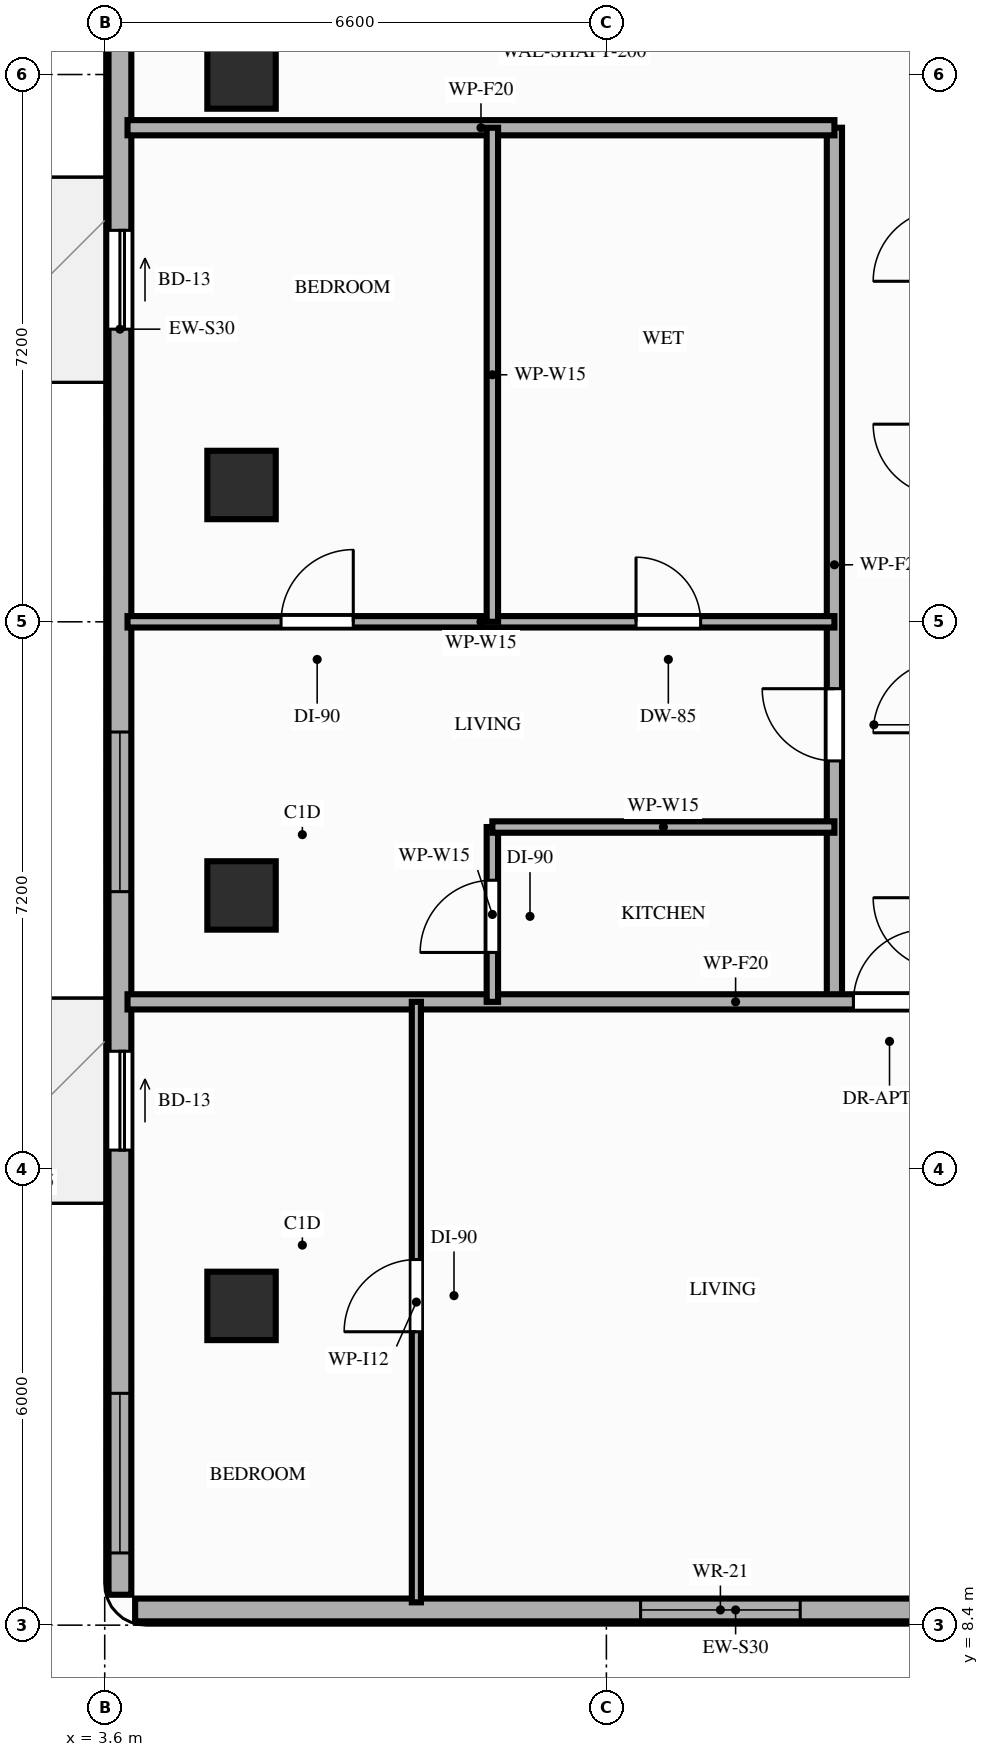
"""IFC4 building model, lengths in metres.
Left out: names, types, materials, properties, quantities, classifications, styles, units other than length and angle.
Written with IfcOpenShell. Run it as: python <this file> out.ifc"""

import sys

from ifc_helpers import new_model, si_unit, direction, frame, frame_2d, origin, origin_2d, place, context, subcontext, project, spatial, rectangle, extrude, element, fill, save


model = new_model("IFC4")
c1 = context("Model", 3, precision=1e-05, world=origin(), true_north=direction((0.0, 1.0)))
c2 = subcontext(c1, "Body", "Model", "MODEL_VIEW")
j1 = project(units=[si_unit("LENGTHUNIT", "METRE"), si_unit("PLANEANGLEUNIT", "RADIAN")], contexts=[c1])
p1 = place(None, origin())
s1 = spatial("IfcSite", under=j1, at=p1, CompositionType="ELEMENT")
p2 = place(p1, origin())
s2 = spatial("IfcBuilding", under=s1, at=p2, CompositionType="ELEMENT")
p3 = place(p2, frame((0.0, 0.0, 176.0)))
s3 = spatial("IfcBuildingStorey", under=s2, at=p3, CompositionType="ELEMENT", Elevation=176.0)
for number, where, z_axis, x_axis in (
    (1, (5.4, 12.6, 0.0), (0.0, 0.0, 1.0), (1.0, 0.0, 0.0)),
    (2, (5.4, 18.0, 0.0), (0.0, 0.0, 1.0), (1.0, 0.0, 0.0)),
    (3, (5.4, 23.4, 0.0), (0.0, 0.0, 1.0), (1.0, 0.0, 0.0)),
    (4, (5.4, 28.8, 0.0), (0.0, 0.0, 1.0), (1.0, 0.0, 0.0)),
):
    element("IfcColumn", number, at=place(p3, frame(where, z_axis=z_axis, x_axis=x_axis)), inside=s3, PredefinedType="COLUMN", context=c2, shape_type="SweptSolid", body=[
        extrude(rectangle(XDim=0.9, YDim=0.9, at=origin_2d()), origin(), (0.0, 0.0, 1.0), 3.2),
    ])
p4 = place(p3, frame((4.0, 8.6, 0.0), z_axis=(0.0, 0.0, 1.0), x_axis=(1.0, 0.0, 0.0)))
e5 = element("IfcWall", 5, at=p4, inside=s3, PredefinedType="STANDARD", context=c2, shape_type="SweptSolid", body=[
    extrude(rectangle(XDim=15.8, YDim=0.3, at=frame_2d((7.9, 0.0))), origin(), (0.0, 0.0, 1.0), 3.02),
])
p5 = place(p4, frame((6.65, 0.0, 0.85)))
e6 = element("IfcOpeningElement", 6, at=p5, cuts=e5, PredefinedType="OPENING", context=c2, shape_type="SweptSolid", body=[
    extrude(rectangle(XDim=2.1, YDim=1.8, at=frame_2d((1.05, 0.9))), frame((0.0, 0.16, 0.0), z_axis=(0.0, -1.0, 0.0), x_axis=(1.0, 0.0, 0.0)), (0.0, 0.0, 1.0), 0.32),
])
p6 = place(p4, frame((12.63, 0.0, 0.85)))
e7 = element("IfcOpeningElement", 7, at=p6, cuts=e5, PredefinedType="OPENING", context=c2, shape_type="SweptSolid", body=[
    extrude(rectangle(XDim=2.1, YDim=1.8, at=frame_2d((1.05, 0.9))), frame((0.0, 0.16, 0.0), z_axis=(0.0, -1.0, 0.0), x_axis=(1.0, 0.0, 0.0)), (0.0, 0.0, 1.0), 0.32),
])
p7 = place(p3, frame((3.8, 42.1, 0.0), z_axis=(0.0, 0.0, 1.0), x_axis=(0.0, -1.0, 0.0)))
e8 = element("IfcWall", 8, at=p7, inside=s3, PredefinedType="STANDARD", context=c2, shape_type="SweptSolid", body=[
    extrude(rectangle(XDim=33.3, YDim=0.3, at=frame_2d((16.65, 0.0))), origin(), (0.0, 0.0, 1.0), 2.71),
])
p8 = place(p7, frame((26.15, 0.0, 0.0)))
e9 = element("IfcOpeningElement", 9, at=p8, cuts=e8, PredefinedType="OPENING", context=c2, shape_type="SweptSolid", body=[
    extrude(rectangle(XDim=1.3, YDim=2.08, at=frame_2d((0.65, 1.04))), frame((0.0, 0.16, 0.0), z_axis=(0.0, -1.0, 0.0), x_axis=(1.0, 0.0, 0.0)), (0.0, 0.0, 1.0), 0.32),
])
p9 = place(p7, frame((15.35, 0.0, 0.0)))
e10 = element("IfcOpeningElement", 10, at=p9, cuts=e8, PredefinedType="OPENING", context=c2, shape_type="SweptSolid", body=[
    extrude(rectangle(XDim=1.3, YDim=2.08, at=frame_2d((0.65, 1.04))), frame((0.0, 0.16, 0.0), z_axis=(0.0, -1.0, 0.0), x_axis=(1.0, 0.0, 0.0)), (0.0, 0.0, 1.0), 0.32),
])
p10 = place(p7, frame((21.95, 0.0, 0.85)))
e11 = element("IfcOpeningElement", 11, at=p10, cuts=e8, PredefinedType="OPENING", context=c2, shape_type="SweptSolid", body=[
    extrude(rectangle(XDim=2.1, YDim=1.61, at=frame_2d((1.05, 0.805))), frame((0.0, 0.16, 0.0), z_axis=(0.0, -1.0, 0.0), x_axis=(1.0, 0.0, 0.0)), (0.0, 0.0, 1.0), 0.32),
])
p11 = place(p7, frame((30.65, 0.0, 0.85)))
e12 = element("IfcOpeningElement", 12, at=p11, cuts=e8, PredefinedType="OPENING", context=c2, shape_type="SweptSolid", body=[
    extrude(rectangle(XDim=2.1, YDim=1.61, at=frame_2d((1.05, 0.805))), frame((0.0, 0.16, 0.0), z_axis=(0.0, -1.0, 0.0), x_axis=(1.0, 0.0, 0.0)), (0.0, 0.0, 1.0), 0.32),
])
p12 = place(p7, frame((9.75, 0.0, 0.85)))
e13 = element("IfcOpeningElement", 13, at=p12, cuts=e8, PredefinedType="OPENING", context=c2, shape_type="SweptSolid", body=[
    extrude(rectangle(XDim=2.1, YDim=1.61, at=frame_2d((1.05, 0.805))), frame((0.0, 0.16, 0.0), z_axis=(0.0, -1.0, 0.0), x_axis=(1.0, 0.0, 0.0)), (0.0, 0.0, 1.0), 0.32),
])
p13 = place(p7, frame((3.65, 0.0, 0.85)))
e14 = element("IfcOpeningElement", 14, at=p13, cuts=e8, PredefinedType="OPENING", context=c2, shape_type="SweptSolid", body=[
    extrude(rectangle(XDim=2.1, YDim=1.61, at=frame_2d((1.05, 0.805))), frame((0.0, 0.16, 0.0), z_axis=(0.0, -1.0, 0.0), x_axis=(1.0, 0.0, 0.0)), (0.0, 0.0, 1.0), 0.32),
])
p14 = place(p3, frame((13.2, 16.6, 0.0), z_axis=(0.0, 0.0, 1.0), x_axis=(0.0, 1.0, 0.0)))
e15 = element("IfcWall", 15, at=p14, inside=s3, PredefinedType="PARTITIONING", context=c2, shape_type="SweptSolid", body=[
    extrude(rectangle(XDim=11.5, YDim=0.2, at=frame_2d((5.75, 0.0))), origin(), (0.0, 0.0, 1.0), 2.46),
])
p15 = place(p14, frame((3.17, 0.0, 0.0)))
e16 = element("IfcOpeningElement", 16, at=p15, cuts=e15, PredefinedType="OPENING", context=c2, shape_type="SweptSolid", body=[
    extrude(rectangle(XDim=0.95, YDim=2.15, at=frame_2d((0.475, 1.075))), frame((0.0, 0.11, 0.0), z_axis=(0.0, -1.0, 0.0), x_axis=(1.0, 0.0, 0.0)), (0.0, 0.0, 1.0), 0.22),
])
p16 = place(p3, frame((3.9, 16.6, 0.0), z_axis=(0.0, 0.0, 1.0), x_axis=(1.0, 0.0, 0.0)))
e17 = element("IfcWall", 17, at=p16, inside=s3, PredefinedType="PARTITIONING", context=c2, shape_type="SweptSolid", body=[
    extrude(rectangle(XDim=16.0, YDim=0.2, at=frame_2d((8.0, 0.0))), origin(), (0.0, 0.0, 1.0), 2.46),
])
p17 = place(p16, frame((9.55, 0.0, 0.0)))
e18 = element("IfcOpeningElement", 18, at=p17, cuts=e17, PredefinedType="OPENING", context=c2, shape_type="SweptSolid", body=[
    extrude(rectangle(XDim=0.95, YDim=2.15, at=frame_2d((0.475, 1.075))), frame((0.0, 0.11, 0.0), z_axis=(0.0, -1.0, 0.0), x_axis=(1.0, 0.0, 0.0)), (0.0, 0.0, 1.0), 0.22),
])
p18 = place(p3, frame((3.9, 28.1, 0.0), z_axis=(0.0, 0.0, 1.0), x_axis=(1.0, 0.0, 0.0)))
e19 = element("IfcWall", 19, at=p18, inside=s3, PredefinedType="PARTITIONING", context=c2, shape_type="SweptSolid", body=[
    extrude(rectangle(XDim=9.3, YDim=0.2, at=frame_2d((4.65, 0.0))), origin(), (0.0, 0.0, 1.0), 2.46),
])
p19 = place(p3, frame((7.7, 8.7, 0.0), z_axis=(0.0, 0.0, 1.0), x_axis=(0.0, 1.0, 0.0)))
e20 = element("IfcWall", 20, at=p19, inside=s3, PredefinedType="PARTITIONING", context=c2, shape_type="SweptSolid", body=[
    extrude(rectangle(XDim=7.9, YDim=0.12, at=frame_2d((3.95, 0.0))), origin(), (0.0, 0.0, 1.0), 2.46),
])
p20 = place(p19, frame((3.56, 0.0, 0.0)))
e21 = element("IfcOpeningElement", 21, at=p20, cuts=e20, PredefinedType="OPENING", context=c2, shape_type="SweptSolid", body=[
    extrude(rectangle(XDim=0.95, YDim=2.15, at=frame_2d((0.475, 1.075))), frame((0.0, 0.07, 0.0), z_axis=(0.0, -1.0, 0.0), x_axis=(1.0, 0.0, 0.0)), (0.0, 0.0, 1.0), 0.14),
])
p21 = place(p3, frame((3.9, 21.6, 0.0), z_axis=(0.0, 0.0, 1.0), x_axis=(1.0, 0.0, 0.0)))
e22 = element("IfcWall", 22, at=p21, inside=s3, PredefinedType="PARTITIONING", context=c2, shape_type="SweptSolid", body=[
    extrude(rectangle(XDim=9.3, YDim=0.15, at=frame_2d((4.65, 0.0))), origin(), (0.0, 0.0, 1.0), 2.46),
])
p22 = place(p21, frame((2.02, 0.0, 0.0)))
e23 = element("IfcOpeningElement", 23, at=p22, cuts=e22, PredefinedType="OPENING", context=c2, shape_type="SweptSolid", body=[
    extrude(rectangle(XDim=0.95, YDim=2.15, at=frame_2d((0.475, 1.075))), frame((0.0, 0.085, 0.0), z_axis=(0.0, -1.0, 0.0), x_axis=(1.0, 0.0, 0.0)), (0.0, 0.0, 1.0), 0.17),
])
p23 = place(p21, frame((6.69, 0.0, 0.0)))
e24 = element("IfcOpeningElement", 24, at=p23, cuts=e22, PredefinedType="OPENING", context=c2, shape_type="SweptSolid", body=[
    extrude(rectangle(XDim=0.85, YDim=2.1, at=frame_2d((0.425, 1.05))), frame((0.0, 0.085, 0.0), z_axis=(0.0, -1.0, 0.0), x_axis=(1.0, 0.0, 0.0)), (0.0, 0.0, 1.0), 0.17),
])
p24 = place(p3, frame((8.7, 21.6, 0.0), z_axis=(0.0, 0.0, 1.0), x_axis=(0.0, 1.0, 0.0)))
e25 = element("IfcWall", 25, at=p24, inside=s3, PredefinedType="PARTITIONING", context=c2, shape_type="SweptSolid", body=[
    extrude(rectangle(XDim=6.5, YDim=0.15, at=frame_2d((3.25, 0.0))), origin(), (0.0, 0.0, 1.0), 2.46),
])
p25 = place(p3, frame((8.7, 16.6, 0.0), z_axis=(0.0, 0.0, 1.0), x_axis=(0.0, 1.0, 0.0)))
e26 = element("IfcWall", 26, at=p25, inside=s3, PredefinedType="PARTITIONING", context=c2, shape_type="SweptSolid", body=[
    extrude(rectangle(XDim=2.3, YDim=0.15, at=frame_2d((1.15, 0.0))), origin(), (0.0, 0.0, 1.0), 2.46),
])
p26 = place(p25, frame((0.65, 0.0, 0.0)))
e27 = element("IfcOpeningElement", 27, at=p26, cuts=e26, PredefinedType="OPENING", context=c2, shape_type="SweptSolid", body=[
    extrude(rectangle(XDim=0.95, YDim=2.15, at=frame_2d((0.475, 1.075))), frame((0.0, 0.085, 0.0), z_axis=(0.0, -1.0, 0.0), x_axis=(1.0, 0.0, 0.0)), (0.0, 0.0, 1.0), 0.17),
])
p27 = place(p3, frame((8.7, 18.9, 0.0), z_axis=(0.0, 0.0, 1.0), x_axis=(1.0, 0.0, 0.0)))
e28 = element("IfcWall", 28, at=p27, inside=s3, PredefinedType="PARTITIONING", context=c2, shape_type="SweptSolid", body=[
    extrude(rectangle(XDim=4.5, YDim=0.15, at=frame_2d((2.25, 0.0))), origin(), (0.0, 0.0, 1.0), 3.02),
])
p28 = place(p8, origin())
e29 = element("IfcDoor", 29, at=p28, inside=s3, OperationType="SLIDING_TO_LEFT", PredefinedType="DOOR", context=c2, shape_type="SweptSolid", body=[
    extrude(rectangle(XDim=1.3, YDim=2.08, at=frame_2d((0.65, 1.04))), frame((0.0, 0.025, 0.0), z_axis=(0.0, -1.0, 0.0), x_axis=(1.0, 0.0, 0.0)), (0.0, 0.0, 1.0), 0.05),
])
fill(e9, e29)
p29 = place(p9, origin())
e30 = element("IfcDoor", 30, at=p29, inside=s3, OperationType="SLIDING_TO_LEFT", PredefinedType="DOOR", context=c2, shape_type="SweptSolid", body=[
    extrude(rectangle(XDim=1.3, YDim=2.08, at=frame_2d((0.65, 1.04))), frame((0.0, 0.025, 0.0), z_axis=(0.0, -1.0, 0.0), x_axis=(1.0, 0.0, 0.0)), (0.0, 0.0, 1.0), 0.05),
])
fill(e10, e30)
p30 = place(p5, origin())
e31 = element("IfcWindow", 31, at=p30, inside=s3, PartitioningType="SINGLE_PANEL", PredefinedType="WINDOW", context=c2, shape_type="SweptSolid", body=[
    extrude(rectangle(XDim=2.1, YDim=1.8, at=frame_2d((1.05, 0.9))), frame((0.0, 0.03, 0.0), z_axis=(0.0, -1.0, 0.0), x_axis=(1.0, 0.0, 0.0)), (0.0, 0.0, 1.0), 0.06),
])
fill(e6, e31)
p31 = place(p10, origin())
e32 = element("IfcWindow", 32, at=p31, inside=s3, PartitioningType="SINGLE_PANEL", PredefinedType="WINDOW", context=c2, shape_type="SweptSolid", body=[
    extrude(rectangle(XDim=2.1, YDim=1.61, at=frame_2d((1.05, 0.805))), frame((0.0, 0.03, 0.0), z_axis=(0.0, -1.0, 0.0), x_axis=(1.0, 0.0, 0.0)), (0.0, 0.0, 1.0), 0.06),
])
fill(e11, e32)
p32 = place(p11, origin())
e33 = element("IfcWindow", 33, at=p32, inside=s3, PartitioningType="SINGLE_PANEL", PredefinedType="WINDOW", context=c2, shape_type="SweptSolid", body=[
    extrude(rectangle(XDim=2.1, YDim=1.61, at=frame_2d((1.05, 0.805))), frame((0.0, 0.03, 0.0), z_axis=(0.0, -1.0, 0.0), x_axis=(1.0, 0.0, 0.0)), (0.0, 0.0, 1.0), 0.06),
])
fill(e12, e33)
p33 = place(p17, origin())
e34 = element("IfcDoor", 34, at=p33, inside=s3, OperationType="SINGLE_SWING_RIGHT", PredefinedType="DOOR", context=c2, shape_type="SweptSolid", body=[
    extrude(rectangle(XDim=0.95, YDim=2.15, at=frame_2d((0.475, 1.075))), frame((0.0, 0.025, 0.0), z_axis=(0.0, -1.0, 0.0), x_axis=(1.0, 0.0, 0.0)), (0.0, 0.0, 1.0), 0.05),
])
fill(e18, e34)
p34 = place(p20, origin())
e35 = element("IfcDoor", 35, at=p34, inside=s3, OperationType="SINGLE_SWING_LEFT", PredefinedType="DOOR", context=c2, shape_type="SweptSolid", body=[
    extrude(rectangle(XDim=0.95, YDim=2.15, at=frame_2d((0.475, 1.075))), frame((0.0, 0.025, 0.0), z_axis=(0.0, -1.0, 0.0), x_axis=(1.0, 0.0, 0.0)), (0.0, 0.0, 1.0), 0.05),
])
fill(e21, e35)
p35 = place(p15, origin())
e36 = element("IfcDoor", 36, at=p35, inside=s3, OperationType="SINGLE_SWING_RIGHT", PredefinedType="DOOR", context=c2, shape_type="SweptSolid", body=[
    extrude(rectangle(XDim=0.95, YDim=2.15, at=frame_2d((0.475, 1.075))), frame((0.0, 0.025, 0.0), z_axis=(0.0, -1.0, 0.0), x_axis=(1.0, 0.0, 0.0)), (0.0, 0.0, 1.0), 0.05),
])
fill(e16, e36)
p36 = place(p26, origin())
e37 = element("IfcDoor", 37, at=p36, inside=s3, OperationType="SINGLE_SWING_LEFT", PredefinedType="DOOR", context=c2, shape_type="SweptSolid", body=[
    extrude(rectangle(XDim=0.95, YDim=2.15, at=frame_2d((0.475, 1.075))), frame((0.0, 0.025, 0.0), z_axis=(0.0, -1.0, 0.0), x_axis=(1.0, 0.0, 0.0)), (0.0, 0.0, 1.0), 0.05),
])
fill(e27, e37)
p37 = place(p22, origin())
e38 = element("IfcDoor", 38, at=p37, inside=s3, OperationType="SINGLE_SWING_RIGHT", PredefinedType="DOOR", context=c2, shape_type="SweptSolid", body=[
    extrude(rectangle(XDim=0.95, YDim=2.15, at=frame_2d((0.475, 1.075))), frame((0.0, 0.025, 0.0), z_axis=(0.0, -1.0, 0.0), x_axis=(1.0, 0.0, 0.0)), (0.0, 0.0, 1.0), 0.05),
])
fill(e23, e38)
p38 = place(p23, origin())
e39 = element("IfcDoor", 39, at=p38, inside=s3, OperationType="SINGLE_SWING_LEFT", PredefinedType="DOOR", context=c2, shape_type="SweptSolid", body=[
    extrude(rectangle(XDim=0.85, YDim=2.1, at=frame_2d((0.425, 1.05))), frame((0.0, 0.025, 0.0), z_axis=(0.0, -1.0, 0.0), x_axis=(1.0, 0.0, 0.0)), (0.0, 0.0, 1.0), 0.05),
])
fill(e24, e39)
save(model, sys.argv[1])
